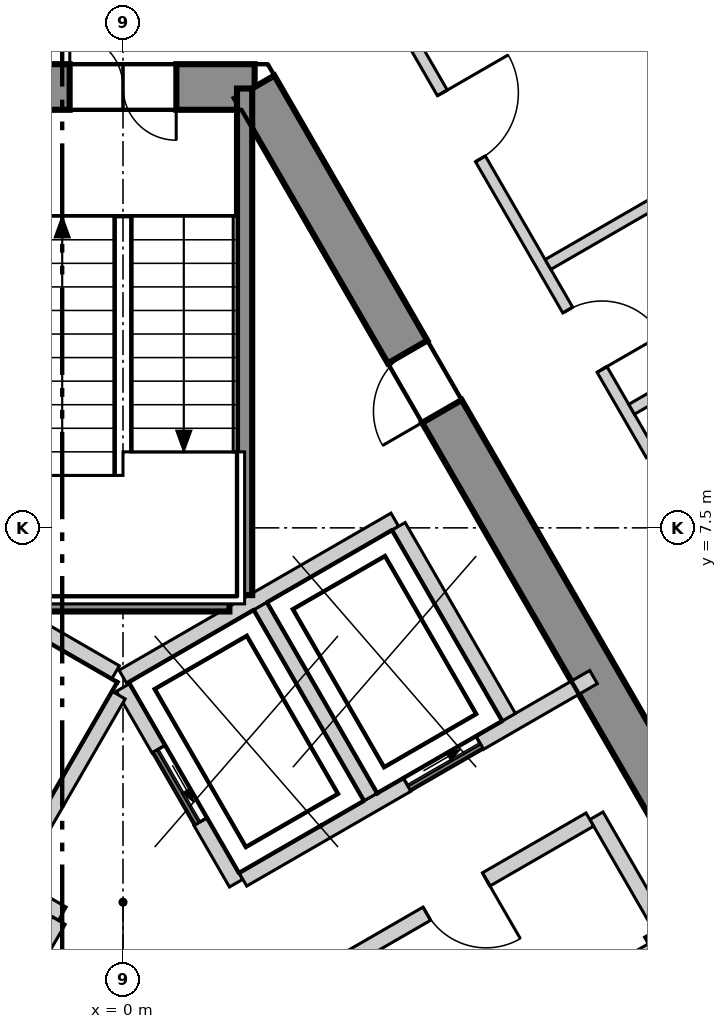
"""IFC4 building model, lengths in metres.
Left out: names, types, materials, properties, quantities, classifications, styles, units other than length and angle.
Written with IfcOpenShell. Run it as: python <this file> out.ifc"""

import sys

from ifc_helpers import new_model, si_unit, direction, frame, frame_2d, origin, place, context, subcontext, project, spatial, polyline, rectangle, outline, extrude, element, fill, save


model = new_model("IFC4")
c1 = context("Model", 3, precision=1e-05, world=origin(), true_north=direction((0.0, 1.0)))
c2 = subcontext(c1, "Body", "Model", "MODEL_VIEW")
j1 = project(units=[si_unit("LENGTHUNIT", "METRE"), si_unit("PLANEANGLEUNIT", "RADIAN")], contexts=[c1])
p1 = place(None, origin())
s1 = spatial("IfcSite", under=j1, at=p1, CompositionType="ELEMENT")
p2 = place(p1, origin())
s2 = spatial("IfcBuilding", under=s1, at=p2, CompositionType="ELEMENT")
p3 = place(p2, frame((0.0, 0.0, 279.1)))
s3 = spatial("IfcBuildingStorey", under=s2, at=p3, CompositionType="ELEMENT", Elevation=279.1)
p4 = place(p3, frame((1.732, 13.3, -0.3), z_axis=(0.0, 0.0, 1.0), x_axis=(-1.0, 0.0, 0.0)))
e1 = element("IfcWall", 1, at=p4, inside=s3, PredefinedType="SHEAR", context=c2, shape_type="SweptSolid", body=[
    extrude(outline(polyline([(-0.173, -0.3), (1.732, -0.3), (3.637, -0.3), (3.291, 0.3), (1.732, 0.3), (0.173, 0.3), (-0.173, -0.3)])), origin(), (0.0, 0.0, 1.0), 3.6),
])
p5 = place(p4, frame((1.032, 0.0, 0.3)))
e2 = element("IfcOpeningElement", 2, at=p5, cuts=e1, PredefinedType="OPENING", context=c2, shape_type="SweptSolid", body=[
    extrude(rectangle(XDim=1.4, YDim=2.1, at=frame_2d((0.7, 1.05))), frame((0.0, 0.31, 0.0), z_axis=(0.0, -1.0, 0.0), x_axis=(1.0, 0.0, 0.0)), (0.0, 0.0, 1.0), 0.62),
])
p6 = place(p3, frame((12.384, -5.15, -0.3), z_axis=(0.0, 0.0, 1.0), x_axis=(-0.500000539815, 0.866025092122, 0.0)))
e3 = element("IfcWall", 3, at=p6, inside=s3, PredefinedType="SHEAR", context=c2, shape_type="SweptSolid", body=[
    extrude(outline(polyline([(-0.173, -0.301), (1.795, -0.301), (3.763, -0.301), (5.731, -0.301), (7.7, -0.301), (9.668, -0.301), (11.636, -0.301), (13.604, -0.3), (15.573, -0.3), (17.541, -0.3), (19.509, -0.3), (21.477, -0.3), (21.131, 0.3), (19.226, 0.3), (17.321, 0.3), (15.415, 0.3), (13.51, 0.3), (11.605, 0.3), (9.699, 0.3), (7.794, 0.3), (5.889, 0.3), (3.984, 0.3), (2.078, 0.3), (0.173, 0.3), (-0.173, -0.301)])), origin(), (0.0, 0.0, 1.0), 3.6),
])
p7 = place(p6, frame((16.378, 0.0, 0.3)))
e4 = element("IfcOpeningElement", 4, at=p7, cuts=e3, PredefinedType="OPENING", context=c2, shape_type="SweptSolid", body=[
    extrude(rectangle(XDim=0.9, YDim=2.1, at=frame_2d((0.45, 1.05))), frame((0.0, 0.31, 0.0), z_axis=(0.0, -1.0, 0.0), x_axis=(1.0, 0.0, 0.0)), (0.0, 0.0, 1.0), 0.621),
])
p8 = place(p6, frame((3.976, 0.0, 0.3)))
e5 = element("IfcOpeningElement", 5, at=p8, cuts=e3, PredefinedType="OPENING", context=c2, shape_type="SweptSolid", body=[
    extrude(rectangle(XDim=1.0, YDim=2.1, at=frame_2d((0.5, 1.05))), frame((0.0, 0.31, 0.0), z_axis=(0.0, -1.0, 0.0), x_axis=(1.0, 0.0, 0.0)), (0.0, 0.0, 1.0), 0.621),
])
p9 = place(p3, frame((25.791, -11.962, 0.0), z_axis=(0.0, 0.0, 1.0), x_axis=(-0.500006870765, 0.86602143691, 0.0)))
e6 = element("IfcWall", 6, at=p9, inside=s3, PredefinedType="ELEMENTEDWALL", context=c2, shape_type="SweptSolid", body=[
    extrude(rectangle(XDim=46.49, YDim=0.2, at=frame_2d((23.245, 0.0))), origin(), (0.0, 0.0, 1.0), 3.3),
])
p10 = place(p9, frame((2.197, 0.0, 0.9)))
e7 = element("IfcOpeningElement", 7, at=p10, cuts=e6, PredefinedType="OPENING", context=c2, shape_type="SweptSolid", body=[
    extrude(rectangle(XDim=3.7, YDim=2.2, at=frame_2d((1.85, 1.1))), frame((0.0, 0.11, 0.0), z_axis=(0.0, -1.0, 0.0), x_axis=(1.0, 0.0, 0.0)), (0.0, 0.0, 1.0), 0.22),
])
p11 = place(p9, frame((7.685, 0.0, 0.9)))
e8 = element("IfcOpeningElement", 8, at=p11, cuts=e6, PredefinedType="OPENING", context=c2, shape_type="SweptSolid", body=[
    extrude(rectangle(XDim=3.7, YDim=2.2, at=frame_2d((1.85, 1.1))), frame((0.0, 0.11, 0.0), z_axis=(0.0, -1.0, 0.0), x_axis=(1.0, 0.0, 0.0)), (0.0, 0.0, 1.0), 0.22),
])
p12 = place(p9, frame((13.173, 0.0, 0.9)))
e9 = element("IfcOpeningElement", 9, at=p12, cuts=e6, PredefinedType="OPENING", context=c2, shape_type="SweptSolid", body=[
    extrude(rectangle(XDim=3.7, YDim=2.2, at=frame_2d((1.85, 1.1))), frame((0.0, 0.11, 0.0), z_axis=(0.0, -1.0, 0.0), x_axis=(1.0, 0.0, 0.0)), (0.0, 0.0, 1.0), 0.22),
])
p13 = place(p9, frame((18.661, 0.0, 0.9)))
e10 = element("IfcOpeningElement", 10, at=p13, cuts=e6, PredefinedType="OPENING", context=c2, shape_type="SweptSolid", body=[
    extrude(rectangle(XDim=3.7, YDim=2.2, at=frame_2d((1.85, 1.1))), frame((0.0, 0.11, 0.0), z_axis=(0.0, -1.0, 0.0), x_axis=(1.0, 0.0, 0.0)), (0.0, 0.0, 1.0), 0.22),
])
p14 = place(p9, frame((24.149, 0.0, 0.9)))
e11 = element("IfcOpeningElement", 11, at=p14, cuts=e6, PredefinedType="OPENING", context=c2, shape_type="SweptSolid", body=[
    extrude(rectangle(XDim=3.7, YDim=2.2, at=frame_2d((1.85, 1.1))), frame((0.0, 0.11, 0.0), z_axis=(0.0, -1.0, 0.0), x_axis=(1.0, 0.0, 0.0)), (0.0, 0.0, 1.0), 0.22),
])
p15 = place(p9, frame((29.637, 0.0, 0.9)))
e12 = element("IfcOpeningElement", 12, at=p15, cuts=e6, PredefinedType="OPENING", context=c2, shape_type="SweptSolid", body=[
    extrude(rectangle(XDim=3.7, YDim=2.2, at=frame_2d((1.85, 1.1))), frame((0.0, 0.11, 0.0), z_axis=(0.0, -1.0, 0.0), x_axis=(1.0, 0.0, 0.0)), (0.0, 0.0, 1.0), 0.22),
])
p16 = place(p9, frame((35.125, 0.0, 0.9)))
e13 = element("IfcOpeningElement", 13, at=p16, cuts=e6, PredefinedType="OPENING", context=c2, shape_type="SweptSolid", body=[
    extrude(rectangle(XDim=3.7, YDim=2.2, at=frame_2d((1.85, 1.1))), frame((0.0, 0.11, 0.0), z_axis=(0.0, -1.0, 0.0), x_axis=(1.0, 0.0, 0.0)), (0.0, 0.0, 1.0), 0.22),
])
p17 = place(p9, frame((40.613, 0.0, 0.9)))
e14 = element("IfcOpeningElement", 14, at=p17, cuts=e6, PredefinedType="OPENING", context=c2, shape_type="SweptSolid", body=[
    extrude(rectangle(XDim=3.7, YDim=2.2, at=frame_2d((1.85, 1.1))), frame((0.0, 0.11, 0.0), z_axis=(0.0, -1.0, 0.0), x_axis=(1.0, 0.0, 0.0)), (0.0, 0.0, 1.0), 0.22),
])
p18 = place(p3, frame((-17.678, -10.119, 0.0), z_axis=(0.0, 0.0, 1.0), x_axis=(0.500003190174, 0.866023561929, 0.0)))
e15 = element("IfcWall", 15, at=p18, inside=s3, PredefinedType="PARTITIONING", context=c2, shape_type="SweptSolid", body=[
    extrude(rectangle(XDim=35.356, YDim=0.15, at=frame_2d((17.678, 0.0))), origin(), (0.0, 0.0, 1.0), 3.3),
])
p19 = place(p18, frame((28.706, 0.0, 0.0)))
e16 = element("IfcOpeningElement", 16, at=p19, cuts=e15, PredefinedType="OPENING", context=c2, shape_type="SweptSolid", body=[
    extrude(rectangle(XDim=1.0, YDim=2.1, at=frame_2d((0.5, 1.05))), frame((0.0, 0.085, 0.0), z_axis=(0.0, -1.0, 0.0), x_axis=(1.0, 0.0, 0.0)), (0.0, 0.0, 1.0), 0.17),
])
p20 = place(p18, frame((18.74, 0.0, 0.0)))
e17 = element("IfcOpeningElement", 17, at=p20, cuts=e15, PredefinedType="OPENING", context=c2, shape_type="SweptSolid", body=[
    extrude(rectangle(XDim=1.0, YDim=2.1, at=frame_2d((0.5, 1.05))), frame((0.0, 0.085, 0.0), z_axis=(0.0, -1.0, 0.0), x_axis=(1.0, 0.0, 0.0)), (0.0, 0.0, 1.0), 0.17),
])
p21 = place(p18, frame((9.352, 0.0, 0.0)))
e18 = element("IfcOpeningElement", 18, at=p21, cuts=e15, PredefinedType="OPENING", context=c2, shape_type="SweptSolid", body=[
    extrude(rectangle(XDim=1.0, YDim=2.1, at=frame_2d((0.5, 1.05))), frame((0.0, 0.085, 0.0), z_axis=(0.0, -1.0, 0.0), x_axis=(1.0, 0.0, 0.0)), (0.0, 0.0, 1.0), 0.17),
])
p22 = place(p18, frame((2.777, 0.0, 0.0)))
e19 = element("IfcOpeningElement", 19, at=p22, cuts=e15, PredefinedType="OPENING", context=c2, shape_type="SweptSolid", body=[
    extrude(rectangle(XDim=1.0, YDim=2.1, at=frame_2d((0.5, 1.05))), frame((0.0, 0.085, 0.0), z_axis=(0.0, -1.0, 0.0), x_axis=(1.0, 0.0, 0.0)), (0.0, 0.0, 1.0), 0.17),
])
p23 = place(p3, frame((0.075, 20.37, 0.0), z_axis=(0.0, 0.0, 1.0), x_axis=(0.500003985697, -0.866023102629, 0.0)))
e20 = element("IfcWall", 20, at=p23, inside=s3, PredefinedType="PARTITIONING", context=c2, shape_type="SweptSolid", body=[
    extrude(rectangle(XDim=35.206, YDim=0.15, at=frame_2d((17.603, 0.0))), origin(), (0.0, 0.0, 1.0), 3.3),
])
p24 = place(p23, frame((31.506, 0.0, 0.0)))
e21 = element("IfcOpeningElement", 21, at=p24, cuts=e20, PredefinedType="OPENING", context=c2, shape_type="SweptSolid", body=[
    extrude(rectangle(XDim=1.0, YDim=2.1, at=frame_2d((0.5, 1.05))), frame((0.0, 0.085, 0.0), z_axis=(0.0, -1.0, 0.0), x_axis=(1.0, 0.0, 0.0)), (0.0, 0.0, 1.0), 0.17),
])
p25 = place(p23, frame((26.529, 0.0, 0.0)))
e22 = element("IfcOpeningElement", 22, at=p25, cuts=e20, PredefinedType="OPENING", context=c2, shape_type="SweptSolid", body=[
    extrude(rectangle(XDim=1.0, YDim=2.1, at=frame_2d((0.5, 1.05))), frame((0.0, 0.085, 0.0), z_axis=(0.0, -1.0, 0.0), x_axis=(1.0, 0.0, 0.0)), (0.0, 0.0, 1.0), 0.17),
])
p26 = place(p23, frame((19.442, 0.0, 0.0)))
e23 = element("IfcOpeningElement", 23, at=p26, cuts=e20, PredefinedType="OPENING", context=c2, shape_type="SweptSolid", body=[
    extrude(rectangle(XDim=1.0, YDim=2.1, at=frame_2d((0.5, 1.05))), frame((0.0, 0.085, 0.0), z_axis=(0.0, -1.0, 0.0), x_axis=(1.0, 0.0, 0.0)), (0.0, 0.0, 1.0), 0.17),
])
p27 = place(p23, frame((8.254, 0.0, 0.0)))
e24 = element("IfcOpeningElement", 24, at=p27, cuts=e20, PredefinedType="OPENING", context=c2, shape_type="SweptSolid", body=[
    extrude(rectangle(XDim=1.0, YDim=2.1, at=frame_2d((0.5, 1.05))), frame((0.0, 0.085, 0.0), z_axis=(0.0, -1.0, 0.0), x_axis=(1.0, 0.0, 0.0)), (0.0, 0.0, 1.0), 0.17),
])
p28 = place(p23, frame((13.754, 0.0, 0.0)))
e25 = element("IfcOpeningElement", 25, at=p28, cuts=e20, PredefinedType="OPENING", context=c2, shape_type="SweptSolid", body=[
    extrude(rectangle(XDim=0.9, YDim=2.1, at=frame_2d((0.45, 1.05))), frame((0.0, 0.085, 0.0), z_axis=(0.0, -1.0, 0.0), x_axis=(1.0, 0.0, 0.0)), (0.0, 0.0, 1.0), 0.17),
])
p29 = place(p23, frame((11.554, 0.0, 0.0)))
e26 = element("IfcOpeningElement", 26, at=p29, cuts=e20, PredefinedType="OPENING", context=c2, shape_type="SweptSolid", body=[
    extrude(rectangle(XDim=0.9, YDim=2.1, at=frame_2d((0.45, 1.05))), frame((0.0, 0.085, 0.0), z_axis=(0.0, -1.0, 0.0), x_axis=(1.0, 0.0, 0.0)), (0.0, 0.0, 1.0), 0.17),
])
p30 = place(p23, frame((2.777, 0.0, 0.0)))
e27 = element("IfcOpeningElement", 27, at=p30, cuts=e20, PredefinedType="OPENING", context=c2, shape_type="SweptSolid", body=[
    extrude(rectangle(XDim=1.0, YDim=2.1, at=frame_2d((0.5, 1.05))), frame((0.0, 0.085, 0.0), z_axis=(0.0, -1.0, 0.0), x_axis=(1.0, 0.0, 0.0)), (0.0, 0.0, 1.0), 0.17),
])
for number, where, z_axis, x_axis in (
    (28, (5.592, 10.965, 0.0), (0.0, 0.0, 1.0), (0.866, 0.5, 0.0)),
    (29, (6.692, 9.06, 0.0), (0.0, 0.0, 1.0), (0.866, 0.5, 0.0)),
):
    element("IfcWall", number, at=place(p3, frame(where, z_axis=z_axis, x_axis=x_axis)), inside=s3, PredefinedType="PARTITIONING", context=c2, shape_type="SweptSolid", body=[
        extrude(rectangle(XDim=2.85, YDim=0.15, at=frame_2d((1.425, 0.0))), origin(), (0.0, 0.0, 1.0), 3.3),
    ])
p31 = place(p3, frame((-0.002, 5.541, 0.0), z_axis=(0.0, 0.0, 1.0), x_axis=(0.86600155993, 0.500041296494, 0.0)))
e30 = element("IfcWall", 30, at=p31, inside=s3, PredefinedType="SOLIDWALL", context=c2, shape_type="SweptSolid", body=[
    extrude(rectangle(XDim=4.132, YDim=0.2, at=frame_2d((2.066, 0.0))), origin(), (0.0, 0.0, 1.0), 3.3),
])
p32 = place(p3, frame((0.0, 5.4, 0.0), z_axis=(0.0, 0.0, 1.0), x_axis=(0.500103862429, -0.865965430478, 0.0)))
e31 = element("IfcWall", 31, at=p32, inside=s3, PredefinedType="SOLIDWALL", context=c2, shape_type="SweptSolid", body=[
    extrude(rectangle(XDim=2.973, YDim=0.2, at=frame_2d((1.487, 0.0))), origin(), (0.0, 0.0, 1.0), 3.3),
])
p33 = place(p32, frame((0.937, 0.0, 0.0)))
e32 = element("IfcOpeningElement", 32, at=p33, cuts=e31, PredefinedType="OPENING", context=c2, shape_type="SweptSolid", body=[
    extrude(rectangle(XDim=1.1, YDim=2.1, at=frame_2d((0.55, 1.05))), frame((0.0, 0.11, 0.0), z_axis=(0.0, -1.0, 0.0), x_axis=(1.0, 0.0, 0.0)), (0.0, 0.0, 1.0), 0.22),
])
p34 = place(p3, frame((1.578, 2.874, 0.0), z_axis=(0.0, 0.0, 1.0), x_axis=(0.866045911672, 0.499964477614, 0.0)))
e33 = element("IfcWall", 33, at=p34, inside=s3, PredefinedType="SOLIDWALL", context=c2, shape_type="SweptSolid", body=[
    extrude(rectangle(XDim=5.327, YDim=0.2, at=frame_2d((2.663, 0.0))), origin(), (0.0, 0.0, 1.0), 3.3),
])
p35 = place(p34, frame((2.496, 0.0, 0.0)))
e34 = element("IfcOpeningElement", 34, at=p35, cuts=e33, PredefinedType="OPENING", context=c2, shape_type="SweptSolid", body=[
    extrude(rectangle(XDim=1.1, YDim=2.1, at=frame_2d((0.55, 1.05))), frame((0.0, 0.11, 0.0), z_axis=(0.0, -1.0, 0.0), x_axis=(1.0, 0.0, 0.0)), (0.0, 0.0, 1.0), 0.22),
])
for number, where, z_axis, x_axis in (
    (35, (3.626, 7.52, 0.0), (0.0, 0.0, 1.0), (0.5, -0.866, 0.0)),
    (36, (1.807, 6.47, 0.0), (0.0, 0.0, 1.0), (0.5, -0.866, 0.0)),
):
    element("IfcWall", number, at=place(p3, frame(where, z_axis=z_axis, x_axis=x_axis)), inside=s3, PredefinedType="SOLIDWALL", context=c2, shape_type="SweptSolid", body=[
        extrude(rectangle(XDim=2.9, YDim=0.2, at=frame_2d((1.45, 0.0))), origin(), (0.0, 0.0, 1.0), 3.3),
    ])
p36 = place(p3, frame((6.229, 3.712, 0.0), z_axis=(0.0, 0.0, 1.0), x_axis=(0.499875724984, -0.86609714211, 0.0)))
e37 = element("IfcWall", 37, at=p36, inside=s3, PredefinedType="SOLIDWALL", context=c2, shape_type="SweptSolid", body=[
    extrude(rectangle(XDim=1.701, YDim=0.2, at=frame_2d((0.85, 0.0))), origin(), (0.0, 0.0, 1.0), 3.3),
])
p37 = place(p3, frame((2.548, 1.587, 0.0), z_axis=(0.0, 0.0, 1.0), x_axis=(0.866004344652, 0.500036473714, 0.0)))
e38 = element("IfcWall", 38, at=p37, inside=s3, PredefinedType="SOLIDWALL", context=c2, shape_type="SweptSolid", body=[
    extrude(rectangle(XDim=4.15, YDim=0.2, at=frame_2d((2.075, 0.0))), origin(), (0.0, 0.0, 1.0), 3.3),
])
p38 = place(p37, frame((1.675, 0.0, 0.0)))
e39 = element("IfcOpeningElement", 39, at=p38, cuts=e38, PredefinedType="OPENING", context=c2, shape_type="SweptSolid", body=[
    extrude(rectangle(XDim=0.9, YDim=2.1, at=frame_2d((0.45, 1.05))), frame((0.0, 0.11, 0.0), z_axis=(0.0, -1.0, 0.0), x_axis=(1.0, 0.0, 0.0)), (0.0, 0.0, 1.0), 0.22),
])
p39 = place(p3, frame((-1.488, 2.822, 0.0), z_axis=(0.0, 0.0, 1.0), x_axis=(0.866236612152, -0.499633997809, 0.0)))
e40 = element("IfcWall", 40, at=p39, inside=s3, PredefinedType="SOLIDWALL", context=c2, shape_type="SweptSolid", body=[
    extrude(rectangle(XDim=0.796, YDim=0.2, at=frame_2d((0.398, 0.0))), origin(), (0.0, 0.0, 1.0), 3.3),
])
p40 = place(p3, frame((-2.444, -0.433, 0.0), z_axis=(0.0, 0.0, 1.0), x_axis=(0.500035624827, 0.866004834804, 0.0)))
e41 = element("IfcWall", 41, at=p40, inside=s3, PredefinedType="SOLIDWALL", context=c2, shape_type="SweptSolid", body=[
    extrude(rectangle(XDim=3.194, YDim=0.2, at=frame_2d((1.597, 0.0))), origin(), (0.0, 0.0, 1.0), 3.3),
])
p41 = place(p3, frame((-1.67, 6.507, 0.0), z_axis=(0.0, 0.0, 1.0), x_axis=(0.865941441609, -0.500145398563, 0.0)))
e42 = element("IfcWall", 42, at=p41, inside=s3, PredefinedType="SOLIDWALL", context=c2, shape_type="SweptSolid", body=[
    extrude(rectangle(XDim=1.815, YDim=0.2, at=frame_2d((0.908, 0.0))), origin(), (0.0, 0.0, 1.0), 3.3),
])
p42 = place(p3, frame((-1.438, 2.909, 0.0), z_axis=(0.0, 0.0, 1.0), x_axis=(0.499829630636, 0.866123744241, 0.0)))
e43 = element("IfcWall", 43, at=p42, inside=s3, PredefinedType="SOLIDWALL", context=c2, shape_type="SweptSolid", body=[
    extrude(rectangle(XDim=2.761, YDim=0.2, at=frame_2d((1.38, 0.0))), origin(), (0.0, 0.0, 1.0), 3.3),
])
p43 = place(p3, frame((6.826, 1.978, 0.0), z_axis=(0.0, 0.0, 1.0), x_axis=(0.499990139034, -0.866031096941, 0.0)))
e44 = element("IfcWall", 44, at=p43, inside=s3, PredefinedType="SOLIDWALL", context=c2, shape_type="SweptSolid", body=[
    extrude(rectangle(XDim=3.0, YDim=0.2, at=frame_2d((1.5, 0.0))), origin(), (0.0, 0.0, 1.0), 3.3),
])
p44 = place(p3, frame((6.912, 2.028, 0.0), z_axis=(0.0, 0.0, 1.0), x_axis=(0.866559367082, 0.499074005857, 0.0)))
e45 = element("IfcWall", 45, at=p44, inside=s3, PredefinedType="SOLIDWALL", context=c2, shape_type="SweptSolid", body=[
    extrude(rectangle(XDim=0.152, YDim=0.2, at=frame_2d((0.076, 0.0))), origin(), (0.0, 0.0, 1.0), 3.3),
])
p45 = place(p3, frame((1.6, 6.615, 0.0), z_axis=(0.0, 0.0, 1.0), x_axis=(0.0, 1.0, 0.0)))
e46 = element("IfcWall", 46, at=p45, inside=s3, PredefinedType="SOLIDWALL", context=c2, shape_type="SweptSolid", body=[
    extrude(rectangle(XDim=6.665, YDim=0.2, at=frame_2d((3.333, 0.0))), origin(), (0.0, 0.0, 1.0), 3.3),
])
p46 = place(p3, frame((-1.4, 6.5, 0.0), z_axis=(0.0, 0.0, 1.0), x_axis=(1.0, 0.0, 0.0)))
e47 = element("IfcWall", 47, at=p46, inside=s3, PredefinedType="SOLIDWALL", context=c2, shape_type="SweptSolid", body=[
    extrude(rectangle(XDim=2.8, YDim=0.2, at=frame_2d((1.4, 0.0))), origin(), (0.0, 0.0, 1.0), 3.3),
])
p47 = place(p33, origin())
e48 = element("IfcDoor", 48, at=p47, inside=s3, OperationType="SLIDING_TO_LEFT", PredefinedType="DOOR", context=c2, shape_type="SweptSolid", body=[
    extrude(rectangle(XDim=1.1, YDim=2.1, at=frame_2d((0.55, 1.05))), frame((0.0, 0.025, 0.0), z_axis=(0.0, -1.0, 0.0), x_axis=(1.0, 0.0, 0.0)), (0.0, 0.0, 1.0), 0.05),
])
fill(e32, e48)
p48 = place(p35, origin())
e49 = element("IfcDoor", 49, at=p48, inside=s3, OperationType="SLIDING_TO_LEFT", PredefinedType="DOOR", context=c2, shape_type="SweptSolid", body=[
    extrude(rectangle(XDim=1.1, YDim=2.1, at=frame_2d((0.55, 1.05))), frame((0.0, 0.025, 0.0), z_axis=(0.0, -1.0, 0.0), x_axis=(1.0, 0.0, 0.0)), (0.0, 0.0, 1.0), 0.05),
])
fill(e34, e49)
p49 = place(p27, origin())
e50 = element("IfcDoor", 50, at=p49, inside=s3, OperationType="SINGLE_SWING_RIGHT", PredefinedType="DOOR", context=c2, shape_type="SweptSolid", body=[
    extrude(rectangle(XDim=1.0, YDim=2.1, at=frame_2d((0.5, 1.05))), frame((0.0, 0.025, 0.0), z_axis=(0.0, -1.0, 0.0), x_axis=(1.0, 0.0, 0.0)), (0.0, 0.0, 1.0), 0.05),
])
fill(e24, e50)
p50 = place(p29, origin())
e51 = element("IfcDoor", 51, at=p50, inside=s3, OperationType="SINGLE_SWING_LEFT", PredefinedType="DOOR", context=c2, shape_type="SweptSolid", body=[
    extrude(rectangle(XDim=0.9, YDim=2.1, at=frame_2d((0.45, 1.05))), frame((0.0, 0.025, 0.0), z_axis=(0.0, -1.0, 0.0), x_axis=(1.0, 0.0, 0.0)), (0.0, 0.0, 1.0), 0.05),
])
fill(e26, e51)
p51 = place(p5, origin())
e52 = element("IfcDoor", 52, at=p51, inside=s3, OperationType="DOUBLE_DOOR_SINGLE_SWING", PredefinedType="DOOR", context=c2, shape_type="SweptSolid", body=[
    extrude(rectangle(XDim=1.4, YDim=2.1, at=frame_2d((0.7, 1.05))), frame((0.0, 0.025, 0.0), z_axis=(0.0, -1.0, 0.0), x_axis=(1.0, 0.0, 0.0)), (0.0, 0.0, 1.0), 0.05),
])
fill(e2, e52)
p52 = place(p7, origin())
e53 = element("IfcDoor", 53, at=p52, inside=s3, OperationType="SINGLE_SWING_RIGHT", PredefinedType="DOOR", context=c2, shape_type="SweptSolid", body=[
    extrude(rectangle(XDim=0.9, YDim=2.1, at=frame_2d((0.45, 1.05))), frame((0.0, 0.025, 0.0), z_axis=(0.0, -1.0, 0.0), x_axis=(1.0, 0.0, 0.0)), (0.0, 0.0, 1.0), 0.05),
])
fill(e4, e53)
p53 = place(p38, origin())
e54 = element("IfcDoor", 54, at=p53, inside=s3, OperationType="SINGLE_SWING_RIGHT", PredefinedType="DOOR", context=c2, shape_type="SweptSolid", body=[
    extrude(rectangle(XDim=0.9, YDim=2.1, at=frame_2d((0.45, 1.05))), frame((0.0, 0.025, 0.0), z_axis=(0.0, -1.0, 0.0), x_axis=(1.0, 0.0, 0.0)), (0.0, 0.0, 1.0), 0.05),
])
fill(e39, e54)
save(model, sys.argv[1])
